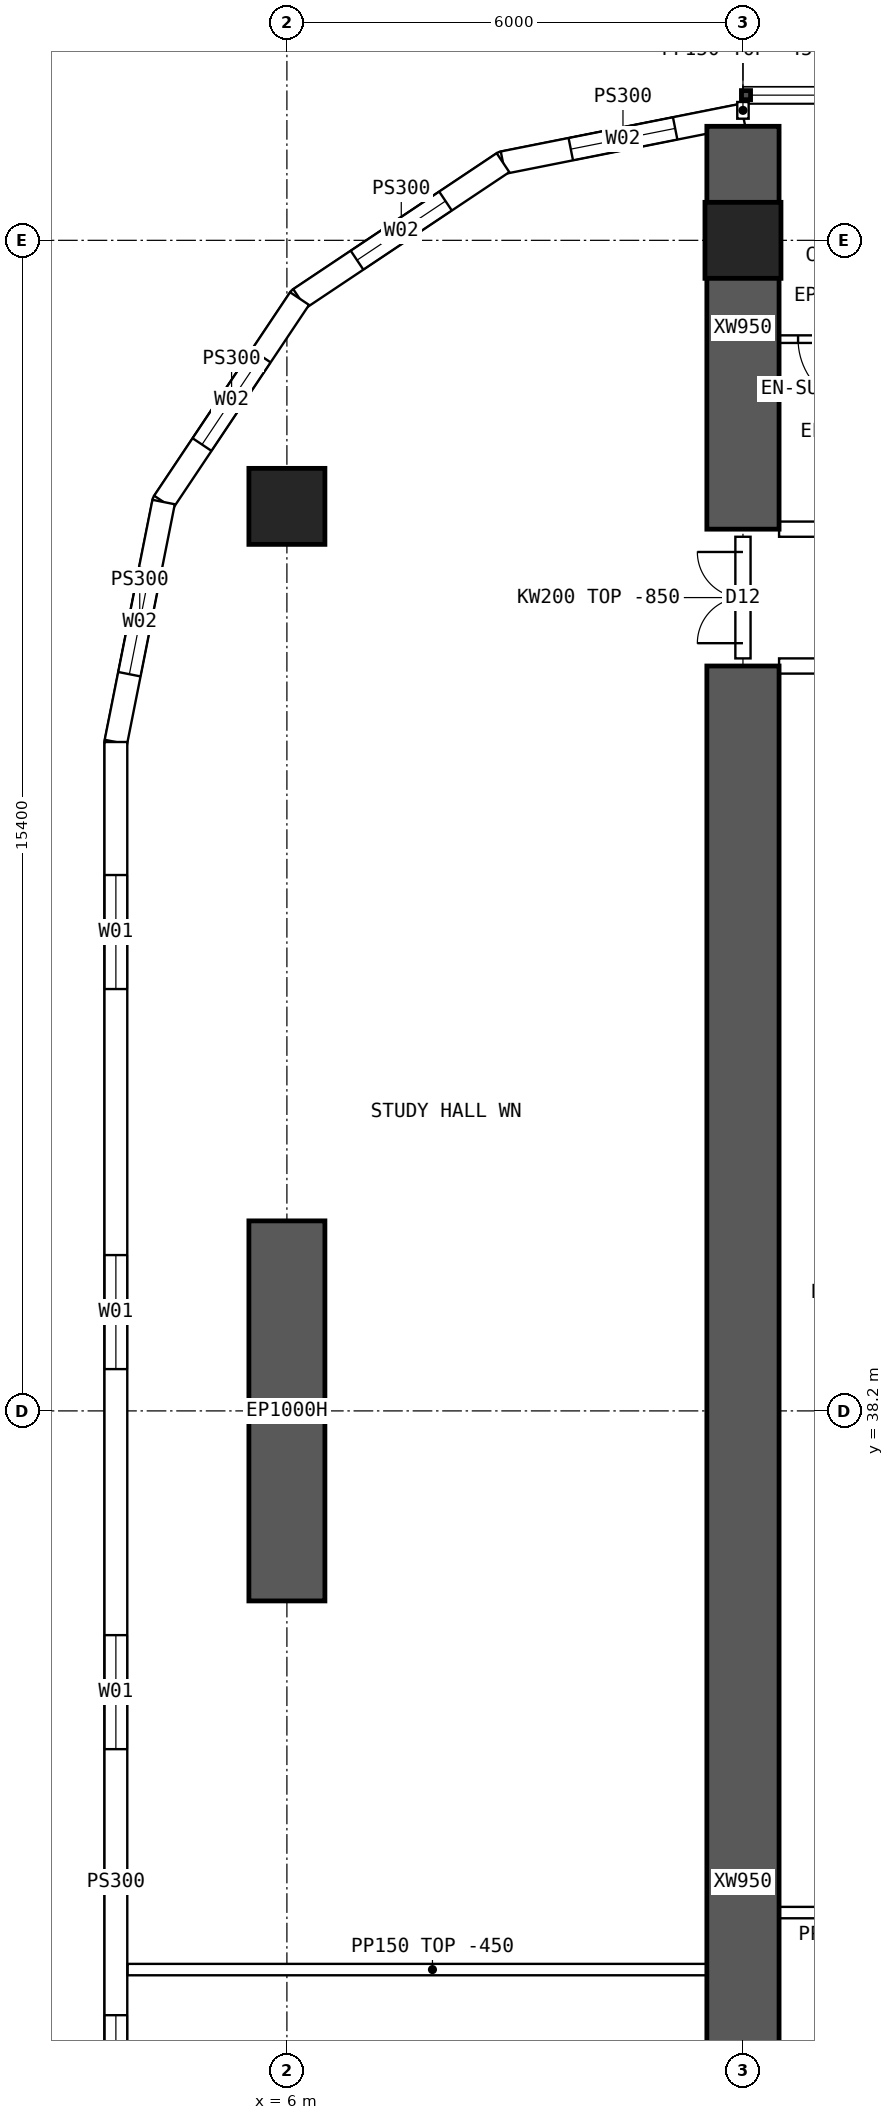
"""IFC4 building model, lengths in metres.
Left out: names, types, materials, properties, quantities, classifications, styles, units other than length and angle.
Written with IfcOpenShell. Run it as: python <this file> out.ifc"""

import sys

from ifc_helpers import new_model, si_unit, direction, frame, frame_2d, origin, origin_2d, place, context, subcontext, project, spatial, polyline, rectangle, hollow_rectangle, outline, extrude, element, fill, save


model = new_model("IFC4")
c1 = context("Model", 3, precision=1e-05, world=origin(), true_north=direction((0.0, 1.0)))
c2 = subcontext(c1, "Body", "Model", "MODEL_VIEW")
j1 = project(units=[si_unit("LENGTHUNIT", "METRE"), si_unit("PLANEANGLEUNIT", "RADIAN")], contexts=[c1])
p1 = place(None, origin())
s1 = spatial("IfcSite", under=j1, at=p1, CompositionType="ELEMENT")
p2 = place(p1, origin())
s2 = spatial("IfcBuilding", under=s1, at=p2, CompositionType="ELEMENT")
p3 = place(p2, frame((0.0, 0.0, 80.65)))
s3 = spatial("IfcBuildingStorey", under=s2, at=p3, CompositionType="ELEMENT", Elevation=80.65)
for number, where, z_axis, x_axis in (
    (1, (12.0, 53.6, 0.0), (0.0, 0.0, 1.0), (1.0, 0.0, 0.0)),
    (2, (6.0, 50.1, 0.0), (0.0, 0.0, 1.0), (1.0, 0.0, 0.0)),
):
    element("IfcColumn", number, at=place(p3, frame(where, z_axis=z_axis, x_axis=x_axis)), inside=s3, PredefinedType="COLUMN", context=c2, shape_type="SweptSolid", body=[
        extrude(hollow_rectangle(XDim=1.0, YDim=1.0, WallThickness=0.1, at=origin_2d()), origin(), (0.0, 0.0, 1.0), 3.75),
    ])
p4 = place(p3, frame((6.0, 35.7, 0.0), z_axis=(0.0, 0.0, 1.0), x_axis=(0.0, 1.0, 0.0)))
e3 = element("IfcWall", 3, at=p4, inside=s3, PredefinedType="SHEAR", context=c2, shape_type="SweptSolid", body=[
    extrude(rectangle(XDim=5.0, YDim=1.0, at=frame_2d((2.5, 0.0))), origin(), (0.0, 0.0, 1.0), 3.75),
])
p5 = place(p3, frame((12.0, 49.8, 0.0), z_axis=(0.0, 0.0, 1.0), x_axis=(0.0, 1.0, 0.0)))
e4 = element("IfcWall", 4, at=p5, inside=s3, PredefinedType="SHEAR", context=c2, shape_type="SweptSolid", body=[
    extrude(rectangle(XDim=5.3, YDim=0.95, at=frame_2d((2.65, 0.0))), origin(), (0.0, 0.0, 1.0), 3.75),
])
p6 = place(p3, frame((12.0, 16.0, 0.0), z_axis=(0.0, 0.0, 1.0), x_axis=(0.0, 1.0, 0.0)))
e5 = element("IfcWall", 5, at=p6, inside=s3, PredefinedType="SHEAR", context=c2, shape_type="SweptSolid", body=[
    extrude(rectangle(XDim=32.0, YDim=0.95, at=frame_2d((16.0, 0.0))), origin(), (0.0, 0.0, 1.0), 3.75),
])
p7 = place(p3, frame((3.75, 47.0, 0.0), z_axis=(0.0, 0.0, 1.0), x_axis=(0.0, -1.0, 0.0)))
e6 = element("IfcWall", 6, at=p7, inside=s3, PredefinedType="SOLIDWALL", context=c2, shape_type="SweptSolid", body=[
    extrude(outline(polyline([(-0.015, -0.15), (30.015, -0.15), (29.985, 0.15), (0.015, 0.15), (-0.015, -0.15)])), origin(), (0.0, 0.0, 1.0), 3.3),
])
p8 = place(p7, frame((1.75, 0.0, 0.9)))
e7 = element("IfcOpeningElement", 7, at=p8, cuts=e6, PredefinedType="OPENING", context=c2, shape_type="SweptSolid", body=[
    extrude(rectangle(XDim=1.5, YDim=2.0, at=frame_2d((0.75, 1.0))), frame((0.0, 0.16, 0.0), z_axis=(0.0, -1.0, 0.0), x_axis=(1.0, 0.0, 0.0)), (0.0, 0.0, 1.0), 0.32),
])
p9 = place(p7, frame((6.75, 0.0, 0.9)))
e8 = element("IfcOpeningElement", 8, at=p9, cuts=e6, PredefinedType="OPENING", context=c2, shape_type="SweptSolid", body=[
    extrude(rectangle(XDim=1.5, YDim=2.0, at=frame_2d((0.75, 1.0))), frame((0.0, 0.16, 0.0), z_axis=(0.0, -1.0, 0.0), x_axis=(1.0, 0.0, 0.0)), (0.0, 0.0, 1.0), 0.32),
])
p10 = place(p7, frame((11.75, 0.0, 0.9)))
e9 = element("IfcOpeningElement", 9, at=p10, cuts=e6, PredefinedType="OPENING", context=c2, shape_type="SweptSolid", body=[
    extrude(rectangle(XDim=1.5, YDim=2.0, at=frame_2d((0.75, 1.0))), frame((0.0, 0.16, 0.0), z_axis=(0.0, -1.0, 0.0), x_axis=(1.0, 0.0, 0.0)), (0.0, 0.0, 1.0), 0.32),
])
p11 = place(p7, frame((16.75, 0.0, 0.9)))
e10 = element("IfcOpeningElement", 10, at=p11, cuts=e6, PredefinedType="OPENING", context=c2, shape_type="SweptSolid", body=[
    extrude(rectangle(XDim=1.5, YDim=2.0, at=frame_2d((0.75, 1.0))), frame((0.0, 0.16, 0.0), z_axis=(0.0, -1.0, 0.0), x_axis=(1.0, 0.0, 0.0)), (0.0, 0.0, 1.0), 0.32),
])
p12 = place(p7, frame((21.75, 0.0, 0.9)))
e11 = element("IfcOpeningElement", 11, at=p12, cuts=e6, PredefinedType="OPENING", context=c2, shape_type="SweptSolid", body=[
    extrude(rectangle(XDim=1.5, YDim=2.0, at=frame_2d((0.75, 1.0))), frame((0.0, 0.16, 0.0), z_axis=(0.0, -1.0, 0.0), x_axis=(1.0, 0.0, 0.0)), (0.0, 0.0, 1.0), 0.32),
])
p13 = place(p7, frame((26.75, 0.0, 0.9)))
e12 = element("IfcOpeningElement", 12, at=p13, cuts=e6, PredefinedType="OPENING", context=c2, shape_type="SweptSolid", body=[
    extrude(rectangle(XDim=1.5, YDim=2.0, at=frame_2d((0.75, 1.0))), frame((0.0, 0.16, 0.0), z_axis=(0.0, -1.0, 0.0), x_axis=(1.0, 0.0, 0.0)), (0.0, 0.0, 1.0), 0.32),
])
p14 = place(p3, frame((12.0, 55.25, 0.0), z_axis=(0.0, 0.0, 1.0), x_axis=(-0.980787251524, -0.195080412259, 0.0)))
e13 = element("IfcWall", 13, at=p14, inside=s3, PredefinedType="SOLIDWALL", context=c2, shape_type="SweptSolid", body=[
    extrude(outline(polyline([(-0.03, -0.15), (3.249, -0.15), (3.189, 0.15), (0.03, 0.15), (-0.03, -0.15)])), origin(), (0.0, 0.0, 1.0), 3.3),
])
p15 = place(p14, frame((0.909, 0.0, 0.9)))
e14 = element("IfcOpeningElement", 14, at=p15, cuts=e13, PredefinedType="OPENING", context=c2, shape_type="SweptSolid", body=[
    extrude(rectangle(XDim=1.4, YDim=1.8, at=frame_2d((0.7, 0.9))), frame((0.0, 0.16, 0.0), z_axis=(0.0, -1.0, 0.0), x_axis=(1.0, 0.0, 0.0)), (0.0, 0.0, 1.0), 0.32),
])
p16 = place(p3, frame((8.843, 54.622, 0.0), z_axis=(0.0, 0.0, 1.0), x_axis=(-0.831443069936, -0.555609954424, 0.0)))
e15 = element("IfcWall", 15, at=p16, inside=s3, PredefinedType="SOLIDWALL", context=c2, shape_type="SweptSolid", body=[
    extrude(outline(polyline([(-0.03, -0.15), (3.249, -0.15), (3.189, 0.15), (0.03, 0.15), (-0.03, -0.15)])), origin(), (0.0, 0.0, 1.0), 3.3),
])
p17 = place(p16, frame((0.909, 0.0, 0.9)))
e16 = element("IfcOpeningElement", 16, at=p17, cuts=e15, PredefinedType="OPENING", context=c2, shape_type="SweptSolid", body=[
    extrude(rectangle(XDim=1.4, YDim=1.8, at=frame_2d((0.7, 0.9))), frame((0.0, 0.16, 0.0), z_axis=(0.0, -1.0, 0.0), x_axis=(1.0, 0.0, 0.0)), (0.0, 0.0, 1.0), 0.32),
])
p18 = place(p3, frame((6.167, 52.833, 0.0), z_axis=(0.0, 0.0, 1.0), x_axis=(-0.555609954424, -0.831443069936, 0.0)))
e17 = element("IfcWall", 17, at=p18, inside=s3, PredefinedType="SOLIDWALL", context=c2, shape_type="SweptSolid", body=[
    extrude(outline(polyline([(-0.03, -0.15), (3.249, -0.15), (3.189, 0.15), (0.03, 0.15), (-0.03, -0.15)])), origin(), (0.0, 0.0, 1.0), 3.3),
])
p19 = place(p18, frame((0.909, 0.0, 0.9)))
e18 = element("IfcOpeningElement", 18, at=p19, cuts=e17, PredefinedType="OPENING", context=c2, shape_type="SweptSolid", body=[
    extrude(rectangle(XDim=1.4, YDim=1.8, at=frame_2d((0.7, 0.9))), frame((0.0, 0.16, 0.0), z_axis=(0.0, -1.0, 0.0), x_axis=(1.0, 0.0, 0.0)), (0.0, 0.0, 1.0), 0.32),
])
p20 = place(p3, frame((4.378, 50.157, 0.0), z_axis=(0.0, 0.0, 1.0), x_axis=(-0.195080412259, -0.980787251524, 0.0)))
e19 = element("IfcWall", 19, at=p20, inside=s3, PredefinedType="SOLIDWALL", context=c2, shape_type="SweptSolid", body=[
    extrude(outline(polyline([(-0.03, -0.15), (3.234, -0.15), (3.204, 0.15), (0.03, 0.15), (-0.03, -0.15)])), origin(), (0.0, 0.0, 1.0), 3.3),
])
p21 = place(p20, frame((0.909, 0.0, 0.9)))
e20 = element("IfcOpeningElement", 20, at=p21, cuts=e19, PredefinedType="OPENING", context=c2, shape_type="SweptSolid", body=[
    extrude(rectangle(XDim=1.4, YDim=1.8, at=frame_2d((0.7, 0.9))), frame((0.0, 0.16, 0.0), z_axis=(0.0, -1.0, 0.0), x_axis=(1.0, 0.0, 0.0)), (0.0, 0.0, 1.0), 0.32),
])
p22 = place(p3, frame((12.475, 49.8, 0.0), z_axis=(0.0, 0.0, 1.0), x_axis=(1.0, 0.0, 0.0)))
e21 = element("IfcWall", 21, at=p22, inside=s3, PredefinedType="SOLIDWALL", context=c2, shape_type="SweptSolid", body=[
    extrude(outline(polyline([(0.0, 0.0), (5.05, 0.0), (5.05, 2.9), (0.0, 2.9), (0.0, 0.0)])), frame((0.0, 0.1, 0.0), z_axis=(0.0, -1.0, 0.0), x_axis=(1.0, 0.0, 0.0)), (0.0, 0.0, 1.0), 0.2),
])
p23 = place(p22, frame((1.45, 0.0, 0.0)))
e22 = element("IfcOpeningElement", 22, at=p23, cuts=e21, PredefinedType="OPENING", context=c2, shape_type="SweptSolid", body=[
    extrude(rectangle(XDim=0.9, YDim=2.1, at=frame_2d((0.45, 1.05))), frame((0.0, 0.11, 0.0), z_axis=(0.0, -1.0, 0.0), x_axis=(1.0, 0.0, 0.0)), (0.0, 0.0, 1.0), 0.22),
])
p24 = place(p22, frame((2.7, 0.0, 0.0)))
e23 = element("IfcOpeningElement", 23, at=p24, cuts=e21, PredefinedType="OPENING", context=c2, shape_type="SweptSolid", body=[
    extrude(rectangle(XDim=0.9, YDim=2.1, at=frame_2d((0.45, 1.05))), frame((0.0, 0.11, 0.0), z_axis=(0.0, -1.0, 0.0), x_axis=(1.0, 0.0, 0.0)), (0.0, 0.0, 1.0), 0.22),
])
p25 = place(p3, frame((12.475, 48.0, 0.0), z_axis=(0.0, 0.0, 1.0), x_axis=(1.0, 0.0, 0.0)))
e24 = element("IfcWall", 24, at=p25, inside=s3, PredefinedType="SOLIDWALL", context=c2, shape_type="SweptSolid", body=[
    extrude(rectangle(XDim=5.05, YDim=0.2, at=frame_2d((2.525, 0.0))), origin(), (0.0, 0.0, 1.0), 3.3),
])
p26 = place(p25, frame((3.325, 0.0, 0.0)))
e25 = element("IfcOpeningElement", 25, at=p26, cuts=e24, PredefinedType="OPENING", context=c2, shape_type="SweptSolid", body=[
    extrude(rectangle(XDim=1.6, YDim=2.1, at=frame_2d((0.8, 1.05))), frame((0.0, 0.11, 0.0), z_axis=(0.0, -1.0, 0.0), x_axis=(1.0, 0.0, 0.0)), (0.0, 0.0, 1.0), 0.22),
])
p27 = place(p3, frame((12.475, 52.3, 0.0), z_axis=(0.0, 0.0, 1.0), x_axis=(1.0, 0.0, 0.0)))
e26 = element("IfcWall", 26, at=p27, inside=s3, PredefinedType="PARTITIONING", context=c2, shape_type="SweptSolid", body=[
    extrude(rectangle(XDim=1.4, YDim=0.1, at=frame_2d((0.7, 0.0))), origin(), (0.0, 0.0, 1.0), 3.3),
])
p28 = place(p27, frame((0.25, 0.0, 0.0)))
e27 = element("IfcOpeningElement", 27, at=p28, cuts=e26, PredefinedType="OPENING", context=c2, shape_type="SweptSolid", body=[
    extrude(rectangle(XDim=0.9, YDim=2.1, at=frame_2d((0.45, 1.05))), frame((0.0, 0.06, 0.0), z_axis=(0.0, -1.0, 0.0), x_axis=(1.0, 0.0, 0.0)), (0.0, 0.0, 1.0), 0.12),
])
p29 = place(p3, frame((12.0, 31.6, 0.0), z_axis=(0.0, 0.0, 1.0), x_axis=(1.0, 0.0, 0.0)))
e28 = element("IfcWall", 28, at=p29, inside=s3, PredefinedType="PARTITIONING", context=c2, shape_type="SweptSolid", body=[
    extrude(rectangle(XDim=3.6, YDim=0.15, at=frame_2d((1.8, 0.0))), origin(), (0.0, 0.0, 1.0), 3.3),
])
p30 = place(p3, frame((3.905, 30.85, 0.0), z_axis=(0.0, 0.0, 1.0), x_axis=(1.0, 0.0, 0.0)))
e29 = element("IfcWall", 29, at=p30, inside=s3, PredefinedType="PARTITIONING", context=c2, shape_type="SweptSolid", body=[
    extrude(outline(polyline([(0.0, 0.0), (8.02, 0.0), (8.02, 3.3), (2.397, 3.3), (2.395, 2.85), (1.797, 2.85), (1.795, 3.3), (0.0, 3.3), (0.0, 0.0)])), frame((0.0, 0.075, 0.0), z_axis=(0.0, -1.0, 0.0), x_axis=(1.0, 0.0, 0.0)), (0.0, 0.0, 1.0), 0.15),
])
p31 = place(p3, frame((12.0, 48.1, 0.0), z_axis=(0.0, 0.0, 1.0), x_axis=(0.0, 1.0, 0.0)))
e30 = element("IfcWall", 30, at=p31, inside=s3, PredefinedType="SOLIDWALL", context=c2, shape_type="SweptSolid", body=[
    extrude(outline(polyline([(0.0, 0.0), (1.6, 0.0), (1.6, 2.9), (0.0, 2.9), (0.0, 0.0)])), frame((0.0, 0.1, 0.0), z_axis=(0.0, -1.0, 0.0), x_axis=(1.0, 0.0, 0.0)), (0.0, 0.0, 1.0), 0.2),
])
p32 = place(p31, frame((0.2, 0.0, 0.0)))
e31 = element("IfcOpeningElement", 31, at=p32, cuts=e30, PredefinedType="OPENING", context=c2, shape_type="SweptSolid", body=[
    extrude(rectangle(XDim=1.2, YDim=2.1, at=frame_2d((0.6, 1.05))), frame((0.0, 0.11, 0.0), z_axis=(0.0, -1.0, 0.0), x_axis=(1.0, 0.0, 0.0)), (0.0, 0.0, 1.0), 0.22),
])
p33 = place(p3, frame((12.0, 55.2, 0.0), z_axis=(0.0, 0.0, 1.0), x_axis=(0.0, 1.0, 0.0)))
e32 = element("IfcWall", 32, at=p33, inside=s3, PredefinedType="PARTITIONING", context=c2, shape_type="SweptSolid", body=[
    extrude(rectangle(XDim=0.22, YDim=0.15, at=frame_2d((0.11, 0.0))), origin(), (0.0, 0.0, 1.0), 3.3),
])
p34 = place(p8, origin())
e33 = element("IfcWindow", 33, at=p34, inside=s3, PartitioningType="SINGLE_PANEL", PredefinedType="WINDOW", context=c2, shape_type="SweptSolid", body=[
    extrude(rectangle(XDim=1.5, YDim=2.0, at=frame_2d((0.75, 1.0))), frame((0.0, 0.03, 0.0), z_axis=(0.0, -1.0, 0.0), x_axis=(1.0, 0.0, 0.0)), (0.0, 0.0, 1.0), 0.06),
])
fill(e7, e33)
p35 = place(p9, origin())
e34 = element("IfcWindow", 34, at=p35, inside=s3, PartitioningType="SINGLE_PANEL", PredefinedType="WINDOW", context=c2, shape_type="SweptSolid", body=[
    extrude(rectangle(XDim=1.5, YDim=2.0, at=frame_2d((0.75, 1.0))), frame((0.0, 0.03, 0.0), z_axis=(0.0, -1.0, 0.0), x_axis=(1.0, 0.0, 0.0)), (0.0, 0.0, 1.0), 0.06),
])
fill(e8, e34)
p36 = place(p10, origin())
e35 = element("IfcWindow", 35, at=p36, inside=s3, PartitioningType="SINGLE_PANEL", PredefinedType="WINDOW", context=c2, shape_type="SweptSolid", body=[
    extrude(rectangle(XDim=1.5, YDim=2.0, at=frame_2d((0.75, 1.0))), frame((0.0, 0.03, 0.0), z_axis=(0.0, -1.0, 0.0), x_axis=(1.0, 0.0, 0.0)), (0.0, 0.0, 1.0), 0.06),
])
fill(e9, e35)
p37 = place(p11, origin())
e36 = element("IfcWindow", 36, at=p37, inside=s3, PartitioningType="SINGLE_PANEL", PredefinedType="WINDOW", context=c2, shape_type="SweptSolid", body=[
    extrude(rectangle(XDim=1.5, YDim=2.0, at=frame_2d((0.75, 1.0))), frame((0.0, 0.03, 0.0), z_axis=(0.0, -1.0, 0.0), x_axis=(1.0, 0.0, 0.0)), (0.0, 0.0, 1.0), 0.06),
])
fill(e10, e36)
p38 = place(p15, origin())
e37 = element("IfcWindow", 37, at=p38, inside=s3, PartitioningType="SINGLE_PANEL", PredefinedType="WINDOW", context=c2, shape_type="SweptSolid", body=[
    extrude(rectangle(XDim=1.4, YDim=1.8, at=frame_2d((0.7, 0.9))), frame((0.0, 0.03, 0.0), z_axis=(0.0, -1.0, 0.0), x_axis=(1.0, 0.0, 0.0)), (0.0, 0.0, 1.0), 0.06),
])
fill(e14, e37)
p39 = place(p17, origin())
e38 = element("IfcWindow", 38, at=p39, inside=s3, PartitioningType="SINGLE_PANEL", PredefinedType="WINDOW", context=c2, shape_type="SweptSolid", body=[
    extrude(rectangle(XDim=1.4, YDim=1.8, at=frame_2d((0.7, 0.9))), frame((0.0, 0.03, 0.0), z_axis=(0.0, -1.0, 0.0), x_axis=(1.0, 0.0, 0.0)), (0.0, 0.0, 1.0), 0.06),
])
fill(e16, e38)
p40 = place(p19, origin())
e39 = element("IfcWindow", 39, at=p40, inside=s3, PartitioningType="SINGLE_PANEL", PredefinedType="WINDOW", context=c2, shape_type="SweptSolid", body=[
    extrude(rectangle(XDim=1.4, YDim=1.8, at=frame_2d((0.7, 0.9))), frame((0.0, 0.03, 0.0), z_axis=(0.0, -1.0, 0.0), x_axis=(1.0, 0.0, 0.0)), (0.0, 0.0, 1.0), 0.06),
])
fill(e18, e39)
p41 = place(p21, origin())
e40 = element("IfcWindow", 40, at=p41, inside=s3, PartitioningType="SINGLE_PANEL", PredefinedType="WINDOW", context=c2, shape_type="SweptSolid", body=[
    extrude(rectangle(XDim=1.4, YDim=1.8, at=frame_2d((0.7, 0.9))), frame((0.0, 0.03, 0.0), z_axis=(0.0, -1.0, 0.0), x_axis=(1.0, 0.0, 0.0)), (0.0, 0.0, 1.0), 0.06),
])
fill(e20, e40)
p42 = place(p28, origin())
e41 = element("IfcDoor", 41, at=p42, inside=s3, OperationType="SINGLE_SWING_RIGHT", PredefinedType="DOOR", context=c2, shape_type="SweptSolid", body=[
    extrude(rectangle(XDim=0.9, YDim=2.1, at=frame_2d((0.45, 1.05))), frame((0.0, 0.025, 0.0), z_axis=(0.0, -1.0, 0.0), x_axis=(1.0, 0.0, 0.0)), (0.0, 0.0, 1.0), 0.05),
])
fill(e27, e41)
p43 = place(p32, origin())
e42 = element("IfcDoor", 42, at=p43, inside=s3, OperationType="DOUBLE_DOOR_SINGLE_SWING", PredefinedType="DOOR", context=c2, shape_type="SweptSolid", body=[
    extrude(rectangle(XDim=1.2, YDim=2.1, at=frame_2d((0.6, 1.05))), frame((0.0, 0.025, 0.0), z_axis=(0.0, -1.0, 0.0), x_axis=(1.0, 0.0, 0.0)), (0.0, 0.0, 1.0), 0.05),
])
fill(e31, e42)
save(model, sys.argv[1])
